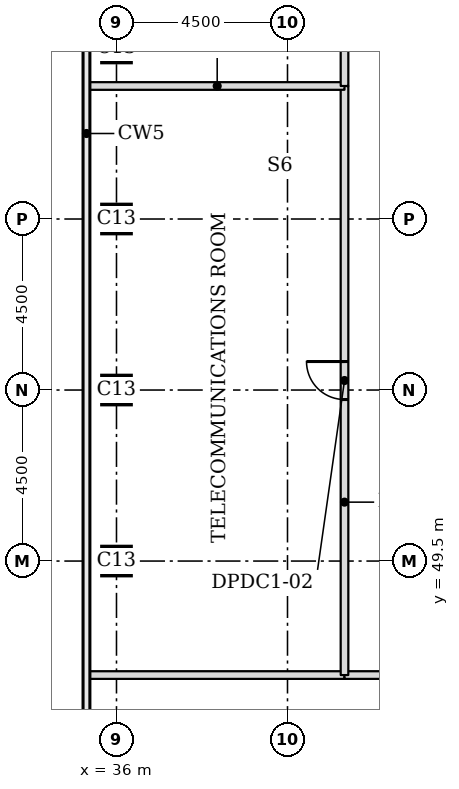
"""IFC4 building model, lengths in metres.
Left out: names, types, materials, properties, quantities, classifications, styles, units other than length and angle.
Written with IfcOpenShell. Run it as: python <this file> out.ifc"""

import sys

from ifc_helpers import new_model, si_unit, direction, frame, frame_2d, origin, origin_2d, place, context, subcontext, project, spatial, rectangle, extrude, element, fill, save


model = new_model("IFC4")
c1 = context("Model", 3, precision=1e-05, world=origin(), true_north=direction((0.0, 1.0)))
c2 = subcontext(c1, "Body", "Model", "MODEL_VIEW")
j1 = project(units=[si_unit("LENGTHUNIT", "METRE"), si_unit("PLANEANGLEUNIT", "RADIAN")], contexts=[c1])
p1 = place(None, origin())
s1 = spatial("IfcSite", under=j1, at=p1, CompositionType="ELEMENT")
p2 = place(p1, origin())
s2 = spatial("IfcBuilding", under=s1, at=p2, CompositionType="ELEMENT")
p3 = place(p2, frame((0.0, 0.0, 263.7)))
s3 = spatial("IfcBuildingStorey", under=s2, at=p3, CompositionType="ELEMENT", Elevation=263.7)
for number, where, z_axis, x_axis in (
    (1, (36.0, 49.5, 0.0), (0.0, 0.0, 1.0), (1.0, 0.0, 0.0)),
    (2, (36.0, 54.0, 0.0), (0.0, 0.0, 1.0), (1.0, 0.0, 0.0)),
    (3, (36.0, 58.5, 0.0), (0.0, 0.0, 1.0), (1.0, 0.0, 0.0)),
    (4, (36.0, 63.0, 0.0), (0.0, 0.0, 1.0), (1.0, 0.0, 0.0)),
):
    element("IfcColumn", number, at=place(p3, frame(where, z_axis=z_axis, x_axis=x_axis)), inside=s3, PredefinedType="COLUMN", context=c2, shape_type="SweptSolid", body=[
        extrude(rectangle(XDim=0.7, YDim=0.7, at=origin_2d()), origin(), (0.0, 0.0, 1.0), 5.0),
    ])
p4 = place(p3, frame((35.3, 46.5, 0.0), z_axis=(0.0, 0.0, 1.0), x_axis=(1.0, 0.0, 0.0)))
e5 = element("IfcWall", 5, at=p4, inside=s3, PredefinedType="PARTITIONING", context=c2, shape_type="SweptSolid", body=[
    extrude(rectangle(XDim=6.7, YDim=0.2, at=frame_2d((3.35, 0.0))), origin(), (0.0, 0.0, 1.0), 4.75),
])
p5 = place(p3, frame((42.0, 46.5, 0.0), z_axis=(0.0, 0.0, 1.0), x_axis=(1.0, 0.0, 0.0)))
e6 = element("IfcWall", 6, at=p5, inside=s3, PredefinedType="PARTITIONING", context=c2, shape_type="SweptSolid", body=[
    extrude(rectangle(XDim=14.0, YDim=0.2, at=frame_2d((7.0, 0.0))), origin(), (0.0, 0.0, 1.0), 4.75),
])
p6 = place(p5, frame((3.579, 0.0, 0.0)))
e7 = element("IfcOpeningElement", 7, at=p6, cuts=e6, PredefinedType="OPENING", context=c2, shape_type="SweptSolid", body=[
    extrude(rectangle(XDim=1.8, YDim=2.1, at=frame_2d((0.9, 1.05))), frame((0.0, 0.11, 0.0), z_axis=(0.0, -1.0, 0.0), x_axis=(1.0, 0.0, 0.0)), (0.0, 0.0, 1.0), 0.22),
])
p7 = place(p3, frame((42.0, 46.5, 0.0), z_axis=(0.0, 0.0, 1.0), x_axis=(0.0, 1.0, 0.0)))
e8 = element("IfcWall", 8, at=p7, inside=s3, PredefinedType="PARTITIONING", context=c2, shape_type="SweptSolid", body=[
    extrude(rectangle(XDim=15.5, YDim=0.2, at=frame_2d((7.75, 0.0))), origin(), (0.0, 0.0, 1.0), 4.75),
])
p8 = place(p7, frame((7.25, 0.0, 0.0)))
e9 = element("IfcOpeningElement", 9, at=p8, cuts=e8, PredefinedType="OPENING", context=c2, shape_type="SweptSolid", body=[
    extrude(rectangle(XDim=1.0, YDim=2.1, at=frame_2d((0.5, 1.05))), frame((0.0, 0.11, 0.0), z_axis=(0.0, -1.0, 0.0), x_axis=(1.0, 0.0, 0.0)), (0.0, 0.0, 1.0), 0.22),
])
p9 = place(p3, frame((35.3, 62.0, 0.0), z_axis=(0.0, 0.0, 1.0), x_axis=(1.0, 0.0, 0.0)))
e10 = element("IfcWall", 10, at=p9, inside=s3, PredefinedType="PARTITIONING", context=c2, shape_type="SweptSolid", body=[
    extrude(rectangle(XDim=6.7, YDim=0.2, at=frame_2d((3.35, 0.0))), origin(), (0.0, 0.0, 1.0), 4.75),
])
p10 = place(p3, frame((42.0, 62.0, 0.0), z_axis=(0.0, 0.0, 1.0), x_axis=(0.0, 1.0, 0.0)))
e11 = element("IfcWall", 11, at=p10, inside=s3, PredefinedType="PARTITIONING", context=c2, shape_type="SweptSolid", body=[
    extrude(rectangle(XDim=13.0, YDim=0.2, at=frame_2d((6.5, 0.0))), origin(), (0.0, 0.0, 1.0), 4.75),
])
p11 = place(p10, frame((8.525, 0.0, 0.0)))
e12 = element("IfcOpeningElement", 12, at=p11, cuts=e11, PredefinedType="OPENING", context=c2, shape_type="SweptSolid", body=[
    extrude(rectangle(XDim=1.0, YDim=2.1, at=frame_2d((0.5, 1.05))), frame((0.0, 0.11, 0.0), z_axis=(0.0, -1.0, 0.0), x_axis=(1.0, 0.0, 0.0)), (0.0, 0.0, 1.0), 0.22),
])
p12 = place(p8, origin())
e13 = element("IfcDoor", 13, at=p12, inside=s3, OperationType="SINGLE_SWING_RIGHT", PredefinedType="DOOR", context=c2, shape_type="SweptSolid", body=[
    extrude(rectangle(XDim=1.0, YDim=2.1, at=frame_2d((0.5, 1.05))), frame((0.0, 0.025, 0.0), z_axis=(0.0, -1.0, 0.0), x_axis=(1.0, 0.0, 0.0)), (0.0, 0.0, 1.0), 0.05),
])
fill(e9, e13)
save(model, sys.argv[1])
